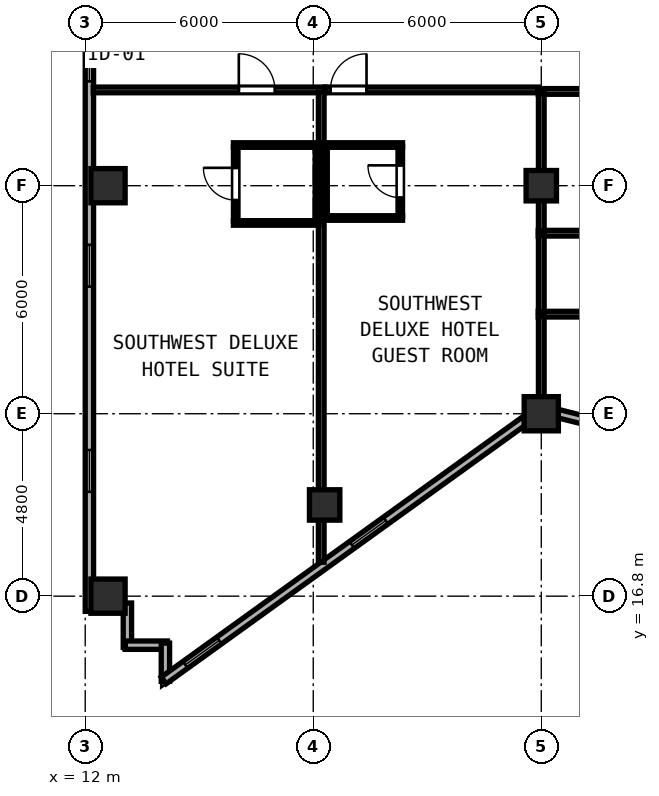
"""IFC4 building model, lengths in metres.
Left out: names, types, materials, properties, quantities, classifications, styles, units other than length and angle.
Written with IfcOpenShell. Run it as: python <this file> out.ifc"""

import sys

from ifc_helpers import new_model, si_unit, direction, frame, frame_2d, origin, origin_2d, place, context, subcontext, project, spatial, rectangle, hollow_rectangle, extrude, element, fill, save


model = new_model("IFC4")
c1 = context("Model", 3, precision=1e-05, world=origin(), true_north=direction((0.0, 1.0)))
c2 = subcontext(c1, "Body", "Model", "MODEL_VIEW")
j1 = project(units=[si_unit("LENGTHUNIT", "METRE"), si_unit("PLANEANGLEUNIT", "RADIAN")], contexts=[c1])
p1 = place(None, origin())
s1 = spatial("IfcSite", under=j1, at=p1, CompositionType="ELEMENT")
p2 = place(p1, origin())
s2 = spatial("IfcBuilding", under=s1, at=p2, CompositionType="ELEMENT")
p3 = place(p2, frame((0.0, 0.0, 169.0)))
s3 = spatial("IfcBuildingStorey", under=s2, at=p3, CompositionType="ELEMENT", Elevation=169.0)
for number, where, z_axis, x_axis in (
    (1, (24.0, 21.6, 0.0), (0.0, 0.0, 1.0), (1.0, 0.0, 0.0)),
    (2, (12.6, 16.8, 0.0), (0.0, 0.0, 1.0), (1.0, 0.0, 0.0)),
    (3, (12.6, 27.6, 0.0), (0.0, 0.0, 1.0), (1.0, 0.0, 0.0)),
):
    element("IfcColumn", number, at=place(p3, frame(where, z_axis=z_axis, x_axis=x_axis)), inside=s3, PredefinedType="COLUMN", context=c2, shape_type="SweptSolid", body=[
        extrude(hollow_rectangle(XDim=0.9, YDim=0.9, WallThickness=0.034, at=origin_2d()), origin(), (0.0, 0.0, 1.0), 3.8),
    ])
for number, where, z_axis, x_axis in (
    (4, (24.0, 27.6, 0.0), (0.0, 0.0, 1.0), (1.0, 0.0, 0.0)),
    (5, (18.3, 19.2, 0.0), (0.0, 0.0, 1.0), (1.0, 0.0, 0.0)),
):
    element("IfcColumn", number, at=place(p3, frame(where, z_axis=z_axis, x_axis=x_axis)), inside=s3, PredefinedType="COLUMN", context=c2, shape_type="SweptSolid", body=[
        extrude(hollow_rectangle(XDim=0.8, YDim=0.8, WallThickness=0.03, at=origin_2d()), origin(), (0.0, 0.0, 1.0), 3.8),
    ])
p4 = place(p3, frame((12.11, 37.545, 0.0), z_axis=(0.0, 0.0, 1.0), x_axis=(0.0, -1.0, 0.0)))
e6 = element("IfcWall", 6, at=p4, inside=s3, PredefinedType="SOLIDWALL", context=c2, shape_type="SweptSolid", body=[
    extrude(rectangle(XDim=21.145, YDim=0.22, at=frame_2d((10.573, 0.0))), origin(), (0.0, 0.0, 1.0), 3.62),
])
p5 = place(p4, frame((0.7, 0.0, 0.85)))
e7 = element("IfcOpeningElement", 7, at=p5, cuts=e6, PredefinedType="OPENING", context=c2, shape_type="SweptSolid", body=[
    extrude(rectangle(XDim=1.1, YDim=1.75, at=frame_2d((0.55, 0.875))), frame((0.0, 0.12, 0.0), z_axis=(0.0, -1.0, 0.0), x_axis=(1.0, 0.0, 0.0)), (0.0, 0.0, 1.0), 0.24),
])
p6 = place(p4, frame((6.1, 0.0, 0.85)))
e8 = element("IfcOpeningElement", 8, at=p6, cuts=e6, PredefinedType="OPENING", context=c2, shape_type="SweptSolid", body=[
    extrude(rectangle(XDim=1.1, YDim=1.75, at=frame_2d((0.55, 0.875))), frame((0.0, 0.12, 0.0), z_axis=(0.0, -1.0, 0.0), x_axis=(1.0, 0.0, 0.0)), (0.0, 0.0, 1.0), 0.24),
])
p7 = place(p4, frame((11.5, 0.0, 0.85)))
e9 = element("IfcOpeningElement", 9, at=p7, cuts=e6, PredefinedType="OPENING", context=c2, shape_type="SweptSolid", body=[
    extrude(rectangle(XDim=1.1, YDim=1.75, at=frame_2d((0.55, 0.875))), frame((0.0, 0.12, 0.0), z_axis=(0.0, -1.0, 0.0), x_axis=(1.0, 0.0, 0.0)), (0.0, 0.0, 1.0), 0.24),
])
p8 = place(p4, frame((16.9, 0.0, 0.85)))
e10 = element("IfcOpeningElement", 10, at=p8, cuts=e6, PredefinedType="OPENING", context=c2, shape_type="SweptSolid", body=[
    extrude(rectangle(XDim=1.1, YDim=1.75, at=frame_2d((0.55, 0.875))), frame((0.0, 0.12, 0.0), z_axis=(0.0, -1.0, 0.0), x_axis=(1.0, 0.0, 0.0)), (0.0, 0.0, 1.0), 0.24),
])
p9 = place(p3, frame((13.11, 16.62, 0.0), z_axis=(0.0, 0.0, 1.0), x_axis=(0.0, -1.0, 0.0)))
e11 = element("IfcWall", 11, at=p9, inside=s3, PredefinedType="SOLIDWALL", context=c2, shape_type="SweptSolid", body=[
    extrude(rectangle(XDim=1.165, YDim=0.22, at=frame_2d((0.583, 0.0))), origin(), (0.0, 0.0, 1.0), 3.62),
])
p10 = place(p3, frame((13.055, 15.51, 0.0), z_axis=(0.0, 0.0, 1.0), x_axis=(1.0, 0.0, 0.0)))
e12 = element("IfcWall", 12, at=p10, inside=s3, PredefinedType="SOLIDWALL", context=c2, shape_type="SweptSolid", body=[
    extrude(rectangle(XDim=1.11, YDim=0.22, at=frame_2d((0.555, 0.0))), origin(), (0.0, 0.0, 1.0), 3.62),
])
p11 = place(p3, frame((14.11, 15.565, 0.0), z_axis=(0.0, 0.0, 1.0), x_axis=(0.0, -1.0, 0.0)))
e13 = element("IfcWall", 13, at=p11, inside=s3, PredefinedType="SOLIDWALL", context=c2, shape_type="SweptSolid", body=[
    extrude(rectangle(XDim=1.005, YDim=0.22, at=frame_2d((0.502, 0.0))), origin(), (0.0, 0.0, 1.0), 3.62),
])
p12 = place(p3, frame((14.065, 14.583, 0.0), z_axis=(0.0, 0.0, 1.0), x_axis=(0.811534737332, 0.58430417601, 0.0)))
e14 = element("IfcWall", 14, at=p12, inside=s3, PredefinedType="SOLIDWALL", context=c2, shape_type="SweptSolid", body=[
    extrude(rectangle(XDim=11.697, YDim=0.22, at=frame_2d((5.849, 0.0))), origin(), (0.0, 0.0, 1.0), 3.215),
])
p13 = place(p12, frame((0.7, 0.0, 0.85)))
e15 = element("IfcOpeningElement", 15, at=p13, cuts=e14, PredefinedType="OPENING", context=c2, shape_type="SweptSolid", body=[
    extrude(rectangle(XDim=1.1, YDim=1.75, at=frame_2d((0.55, 0.875))), frame((0.0, 0.12, 0.0), z_axis=(0.0, -1.0, 0.0), x_axis=(1.0, 0.0, 0.0)), (0.0, 0.0, 1.0), 0.24),
])
p14 = place(p12, frame((6.1, 0.0, 0.85)))
e16 = element("IfcOpeningElement", 16, at=p14, cuts=e14, PredefinedType="OPENING", context=c2, shape_type="SweptSolid", body=[
    extrude(rectangle(XDim=1.1, YDim=1.75, at=frame_2d((0.55, 0.875))), frame((0.0, 0.12, 0.0), z_axis=(0.0, -1.0, 0.0), x_axis=(1.0, 0.0, 0.0)), (0.0, 0.0, 1.0), 0.24),
])
p15 = place(p3, frame((24.442, 21.603, 0.0), z_axis=(0.0, 0.0, 1.0), x_axis=(0.970145648609, -0.242523030833, 0.0)))
e17 = element("IfcWall", 17, at=p15, inside=s3, PredefinedType="SOLIDWALL", context=c2, shape_type="SweptSolid", body=[
    extrude(rectangle(XDim=4.561, YDim=0.22, at=frame_2d((2.281, 0.0))), origin(), (0.0, 0.0, 1.0), 3.215),
])
p16 = place(p15, frame((0.7, 0.0, 0.85)))
e18 = element("IfcOpeningElement", 18, at=p16, cuts=e17, PredefinedType="OPENING", context=c2, shape_type="SweptSolid", body=[
    extrude(rectangle(XDim=1.1, YDim=1.75, at=frame_2d((0.55, 0.875))), frame((0.0, 0.12, 0.0), z_axis=(0.0, -1.0, 0.0), x_axis=(1.0, 0.0, 0.0)), (0.0, 0.0, 1.0), 0.24),
])
for number, where, z_axis, x_axis in (
    (19, (23.92, 30.08, 0.0), (0.0, 0.0, 1.0), (1.0, 0.0, 0.0)),
    (20, (23.92, 26.35, 0.0), (0.0, 0.0, 1.0), (1.0, 0.0, 0.0)),
):
    element("IfcWall", number, at=place(p3, frame(where, z_axis=z_axis, x_axis=x_axis)), inside=s3, PredefinedType="PARTITIONING", context=c2, shape_type="SweptSolid", body=[
        extrude(rectangle(XDim=3.8, YDim=0.15, at=frame_2d((1.9, 0.0))), origin(), (0.0, 0.0, 1.0), 3.62),
    ])
p17 = place(p3, frame((24.0, 26.41, 0.0), z_axis=(0.0, 0.0, 1.0), x_axis=(0.0, 1.0, 0.0)))
e21 = element("IfcWall", 21, at=p17, inside=s3, PredefinedType="PARTITIONING", context=c2, shape_type="SweptSolid", body=[
    extrude(rectangle(XDim=3.61, YDim=0.15, at=frame_2d((1.805, 0.0))), origin(), (0.0, 0.0, 1.0), 3.215),
])
p18 = place(p3, frame((23.92, 24.22, 0.0), z_axis=(0.0, 0.0, 1.0), x_axis=(1.0, 0.0, 0.0)))
e22 = element("IfcWall", 22, at=p18, inside=s3, PredefinedType="PARTITIONING", context=c2, shape_type="SweptSolid", body=[
    extrude(rectangle(XDim=7.36, YDim=0.15, at=frame_2d((3.68, 0.0))), origin(), (0.0, 0.0, 1.0), 3.62),
])
p19 = place(p18, frame((5.845, 0.0, 0.0), z_axis=(0.0, 0.0, 1.0), x_axis=(-1.0, 0.0, 0.0)))
e23 = element("IfcOpeningElement", 23, at=p19, cuts=e22, PredefinedType="OPENING", context=c2, shape_type="SweptSolid", body=[
    extrude(rectangle(XDim=0.95, YDim=2.12, at=frame_2d((0.475, 1.06))), frame((0.0, 0.085, 0.0), z_axis=(0.0, -1.0, 0.0), x_axis=(1.0, 0.0, 0.0)), (0.0, 0.0, 1.0), 0.17),
])
p20 = place(p3, frame((24.0, 21.819, 0.0), z_axis=(0.0, 0.0, 1.0), x_axis=(0.0, 1.0, 0.0)))
e24 = element("IfcWall", 24, at=p20, inside=s3, PredefinedType="PARTITIONING", context=c2, shape_type="SweptSolid", body=[
    extrude(rectangle(XDim=2.341, YDim=0.15, at=frame_2d((1.171, 0.0))), origin(), (0.0, 0.0, 1.0), 3.215),
])
p21 = place(p3, frame((12.212, 30.12, 0.0), z_axis=(0.0, 0.0, 1.0), x_axis=(1.0, 0.0, 0.0)))
e25 = element("IfcWall", 25, at=p21, inside=s3, PredefinedType="PARTITIONING", context=c2, shape_type="SweptSolid", body=[
    extrude(rectangle(XDim=6.098, YDim=0.15, at=frame_2d((3.049, 0.0))), origin(), (0.0, 0.0, 1.0), 3.62),
])
p22 = place(p21, frame((4.779, 0.0, 0.0), z_axis=(0.0, 0.0, 1.0), x_axis=(-1.0, 0.0, 0.0)))
e26 = element("IfcOpeningElement", 26, at=p22, cuts=e25, PredefinedType="OPENING", context=c2, shape_type="SweptSolid", body=[
    extrude(rectangle(XDim=0.95, YDim=2.18, at=frame_2d((0.475, 1.09))), frame((0.0, 0.085, 0.0), z_axis=(0.0, -1.0, 0.0), x_axis=(1.0, 0.0, 0.0)), (0.0, 0.0, 1.0), 0.17),
])
p23 = place(p3, frame((18.21, 17.692, 0.0), z_axis=(0.0, 0.0, 1.0), x_axis=(0.0, 1.0, 0.0)))
e27 = element("IfcWall", 27, at=p23, inside=s3, PredefinedType="PARTITIONING", context=c2, shape_type="SweptSolid", body=[
    extrude(rectangle(XDim=12.368, YDim=0.15, at=frame_2d((6.184, 0.0))), origin(), (0.0, 0.0, 1.0), 3.62),
])
for number, where, z_axis, x_axis in (
    (28, (15.9, 28.67, 0.0), (0.0, 0.0, 1.0), (1.0, 0.0, 0.0)),
    (29, (15.9, 26.62, 0.0), (0.0, 0.0, 1.0), (1.0, 0.0, 0.0)),
):
    element("IfcWall", number, at=place(p3, frame(where, z_axis=z_axis, x_axis=x_axis)), inside=s3, PredefinedType="PARTITIONING", context=c2, shape_type="SweptSolid", body=[
        extrude(rectangle(XDim=2.25, YDim=0.12, at=frame_2d((1.125, 0.0))), origin(), (0.0, 0.0, 1.0), 3.62),
    ])
p24 = place(p3, frame((15.96, 26.665, 0.0), z_axis=(0.0, 0.0, 1.0), x_axis=(0.0, 1.0, 0.0)))
e30 = element("IfcWall", 30, at=p24, inside=s3, PredefinedType="PARTITIONING", context=c2, shape_type="SweptSolid", body=[
    extrude(rectangle(XDim=1.96, YDim=0.12, at=frame_2d((0.98, 0.0))), origin(), (0.0, 0.0, 1.0), 3.62),
])
p25 = place(p24, frame((1.405, 0.0, 0.0), z_axis=(0.0, 0.0, 1.0), x_axis=(-1.0, 0.0, 0.0)))
e31 = element("IfcOpeningElement", 31, at=p25, cuts=e30, PredefinedType="OPENING", context=c2, shape_type="SweptSolid", body=[
    extrude(rectangle(XDim=0.85, YDim=2.1, at=frame_2d((0.425, 1.05))), frame((0.0, 0.07, 0.0), z_axis=(0.0, -1.0, 0.0), x_axis=(1.0, 0.0, 0.0)), (0.0, 0.0, 1.0), 0.14),
])
p26 = place(p3, frame((18.11, 26.665, 0.0), z_axis=(0.0, 0.0, 1.0), x_axis=(0.0, 1.0, 0.0)))
e32 = element("IfcWall", 32, at=p26, inside=s3, PredefinedType="PARTITIONING", context=c2, shape_type="SweptSolid", body=[
    extrude(rectangle(XDim=1.96, YDim=0.12, at=frame_2d((0.98, 0.0))), origin(), (0.0, 0.0, 1.0), 3.62),
])
p27 = place(p3, frame((18.312, 30.12, 0.0), z_axis=(0.0, 0.0, 1.0), x_axis=(1.0, 0.0, 0.0)))
e33 = element("IfcWall", 33, at=p27, inside=s3, PredefinedType="PARTITIONING", context=c2, shape_type="SweptSolid", body=[
    extrude(rectangle(XDim=5.606, YDim=0.15, at=frame_2d((2.803, 0.0))), origin(), (0.0, 0.0, 1.0), 3.62),
])
p28 = place(p27, frame((1.09, 0.0, 0.0), z_axis=(0.0, 0.0, 1.0), x_axis=(-1.0, 0.0, 0.0)))
e34 = element("IfcOpeningElement", 34, at=p28, cuts=e33, PredefinedType="OPENING", context=c2, shape_type="SweptSolid", body=[
    extrude(rectangle(XDim=0.95, YDim=2.15, at=frame_2d((0.475, 1.075))), frame((0.0, 0.085, 0.0), z_axis=(0.0, -1.0, 0.0), x_axis=(1.0, 0.0, 0.0)), (0.0, 0.0, 1.0), 0.17),
])
p29 = place(p3, frame((24.0, 24.28, 0.0), z_axis=(0.0, 0.0, 1.0), x_axis=(0.0, 1.0, 0.0)))
e35 = element("IfcWall", 35, at=p29, inside=s3, PredefinedType="PARTITIONING", context=c2, shape_type="SweptSolid", body=[
    extrude(rectangle(XDim=2.01, YDim=0.15, at=frame_2d((1.005, 0.0))), origin(), (0.0, 0.0, 1.0), 3.215),
])
for number, where, z_axis, x_axis in (
    (36, (18.27, 28.67, 0.0), (0.0, 0.0, 1.0), (1.0, 0.0, 0.0)),
    (37, (18.27, 26.75, 0.0), (0.0, 0.0, 1.0), (1.0, 0.0, 0.0)),
):
    element("IfcWall", number, at=place(p3, frame(where, z_axis=z_axis, x_axis=x_axis)), inside=s3, PredefinedType="PARTITIONING", context=c2, shape_type="SweptSolid", body=[
        extrude(rectangle(XDim=2.08, YDim=0.12, at=frame_2d((1.04, 0.0))), origin(), (0.0, 0.0, 1.0), 3.62),
    ])
p30 = place(p3, frame((18.31, 26.795, 0.0), z_axis=(0.0, 0.0, 1.0), x_axis=(0.0, 1.0, 0.0)))
e38 = element("IfcWall", 38, at=p30, inside=s3, PredefinedType="PARTITIONING", context=c2, shape_type="SweptSolid", body=[
    extrude(rectangle(XDim=1.83, YDim=0.12, at=frame_2d((0.915, 0.0))), origin(), (0.0, 0.0, 1.0), 3.62),
])
p31 = place(p3, frame((20.29, 26.795, 0.0), z_axis=(0.0, 0.0, 1.0), x_axis=(0.0, 1.0, 0.0)))
e39 = element("IfcWall", 39, at=p31, inside=s3, PredefinedType="PARTITIONING", context=c2, shape_type="SweptSolid", body=[
    extrude(rectangle(XDim=1.83, YDim=0.12, at=frame_2d((0.915, 0.0))), origin(), (0.0, 0.0, 1.0), 3.62),
])
p32 = place(p31, frame((0.49, 0.0, 0.0)))
e40 = element("IfcOpeningElement", 40, at=p32, cuts=e39, PredefinedType="OPENING", context=c2, shape_type="SweptSolid", body=[
    extrude(rectangle(XDim=0.85, YDim=2.1, at=frame_2d((0.425, 1.05))), frame((0.0, 0.07, 0.0), z_axis=(0.0, -1.0, 0.0), x_axis=(1.0, 0.0, 0.0)), (0.0, 0.0, 1.0), 0.14),
])
p33 = place(p6, origin())
e41 = element("IfcWindow", 41, at=p33, inside=s3, PartitioningType="SINGLE_PANEL", PredefinedType="WINDOW", context=c2, shape_type="SweptSolid", body=[
    extrude(rectangle(XDim=1.1, YDim=1.75, at=frame_2d((0.55, 0.875))), frame((0.0, 0.03, 0.0), z_axis=(0.0, -1.0, 0.0), x_axis=(1.0, 0.0, 0.0)), (0.0, 0.0, 1.0), 0.06),
])
fill(e8, e41)
p34 = place(p7, origin())
e42 = element("IfcWindow", 42, at=p34, inside=s3, PartitioningType="SINGLE_PANEL", PredefinedType="WINDOW", context=c2, shape_type="SweptSolid", body=[
    extrude(rectangle(XDim=1.1, YDim=1.75, at=frame_2d((0.55, 0.875))), frame((0.0, 0.03, 0.0), z_axis=(0.0, -1.0, 0.0), x_axis=(1.0, 0.0, 0.0)), (0.0, 0.0, 1.0), 0.06),
])
fill(e9, e42)
p35 = place(p8, origin())
e43 = element("IfcWindow", 43, at=p35, inside=s3, PartitioningType="SINGLE_PANEL", PredefinedType="WINDOW", context=c2, shape_type="SweptSolid", body=[
    extrude(rectangle(XDim=1.1, YDim=1.75, at=frame_2d((0.55, 0.875))), frame((0.0, 0.03, 0.0), z_axis=(0.0, -1.0, 0.0), x_axis=(1.0, 0.0, 0.0)), (0.0, 0.0, 1.0), 0.06),
])
fill(e10, e43)
p36 = place(p13, origin())
e44 = element("IfcWindow", 44, at=p36, inside=s3, PartitioningType="SINGLE_PANEL", PredefinedType="WINDOW", context=c2, shape_type="SweptSolid", body=[
    extrude(rectangle(XDim=1.1, YDim=1.75, at=frame_2d((0.55, 0.875))), frame((0.0, 0.03, 0.0), z_axis=(0.0, -1.0, 0.0), x_axis=(1.0, 0.0, 0.0)), (0.0, 0.0, 1.0), 0.06),
])
fill(e15, e44)
p37 = place(p14, origin())
e45 = element("IfcWindow", 45, at=p37, inside=s3, PartitioningType="SINGLE_PANEL", PredefinedType="WINDOW", context=c2, shape_type="SweptSolid", body=[
    extrude(rectangle(XDim=1.1, YDim=1.75, at=frame_2d((0.55, 0.875))), frame((0.0, 0.03, 0.0), z_axis=(0.0, -1.0, 0.0), x_axis=(1.0, 0.0, 0.0)), (0.0, 0.0, 1.0), 0.06),
])
fill(e16, e45)
p38 = place(p22, origin())
e46 = element("IfcDoor", 46, at=p38, inside=s3, OperationType="SINGLE_SWING_RIGHT", PredefinedType="DOOR", context=c2, shape_type="SweptSolid", body=[
    extrude(rectangle(XDim=0.95, YDim=2.18, at=frame_2d((0.475, 1.09))), frame((0.0, 0.025, 0.0), z_axis=(0.0, -1.0, 0.0), x_axis=(1.0, 0.0, 0.0)), (0.0, 0.0, 1.0), 0.05),
])
fill(e26, e46)
p39 = place(p25, origin())
e47 = element("IfcDoor", 47, at=p39, inside=s3, OperationType="SINGLE_SWING_LEFT", PredefinedType="DOOR", context=c2, shape_type="SweptSolid", body=[
    extrude(rectangle(XDim=0.85, YDim=2.1, at=frame_2d((0.425, 1.05))), frame((0.0, 0.025, 0.0), z_axis=(0.0, -1.0, 0.0), x_axis=(1.0, 0.0, 0.0)), (0.0, 0.0, 1.0), 0.05),
])
fill(e31, e47)
p40 = place(p28, origin())
e48 = element("IfcDoor", 48, at=p40, inside=s3, OperationType="SINGLE_SWING_LEFT", PredefinedType="DOOR", context=c2, shape_type="SweptSolid", body=[
    extrude(rectangle(XDim=0.95, YDim=2.15, at=frame_2d((0.475, 1.075))), frame((0.0, 0.025, 0.0), z_axis=(0.0, -1.0, 0.0), x_axis=(1.0, 0.0, 0.0)), (0.0, 0.0, 1.0), 0.05),
])
fill(e34, e48)
p41 = place(p32, origin())
e49 = element("IfcDoor", 49, at=p41, inside=s3, OperationType="SINGLE_SWING_RIGHT", PredefinedType="DOOR", context=c2, shape_type="SweptSolid", body=[
    extrude(rectangle(XDim=0.85, YDim=2.1, at=frame_2d((0.425, 1.05))), frame((0.0, 0.025, 0.0), z_axis=(0.0, -1.0, 0.0), x_axis=(1.0, 0.0, 0.0)), (0.0, 0.0, 1.0), 0.05),
])
fill(e40, e49)
save(model, sys.argv[1])
